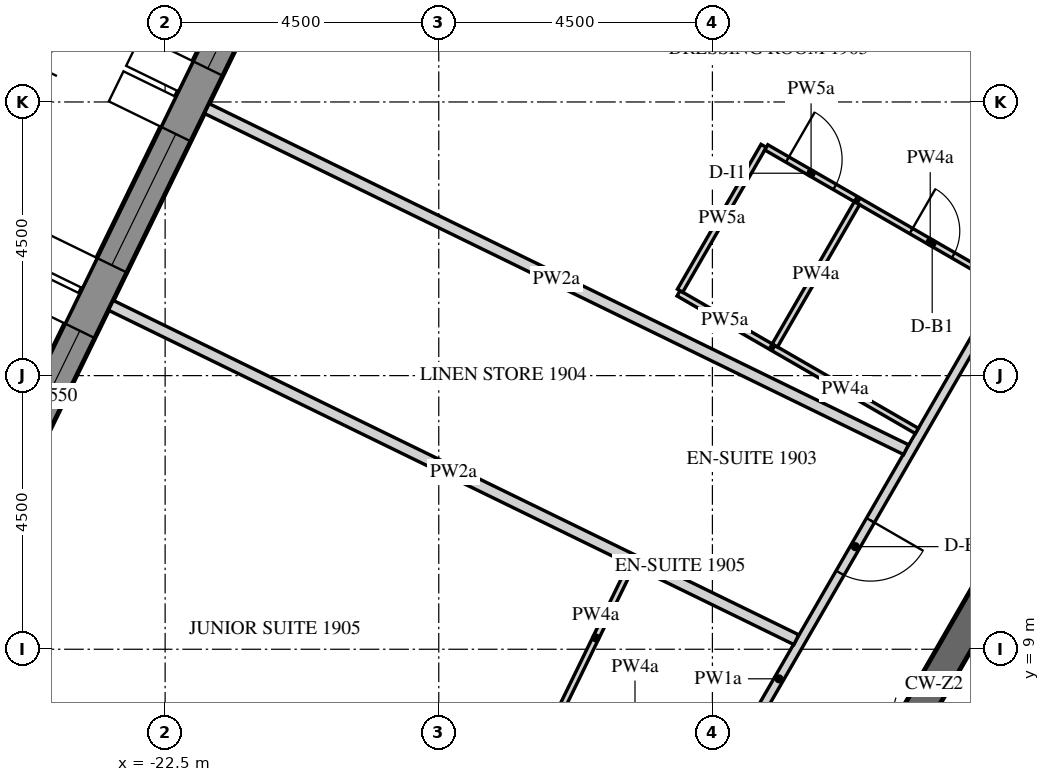
"""IFC4 building model, lengths in metres.
Left out: names, types, materials, properties, quantities, classifications, styles, units other than length and angle.
Written with IfcOpenShell. Run it as: python <this file> out.ifc"""

import sys

from ifc_helpers import new_model, si_unit, direction, frame, frame_2d, origin, place, context, subcontext, project, spatial, polyline, rectangle, outline, extrude, element, fill, save


model = new_model("IFC4")
c1 = context("Model", 3, precision=1e-05, world=origin(), true_north=direction((0.0, 1.0)))
c2 = subcontext(c1, "Body", "Model", "MODEL_VIEW")
j1 = project(units=[si_unit("LENGTHUNIT", "METRE"), si_unit("PLANEANGLEUNIT", "RADIAN")], contexts=[c1])
p1 = place(None, origin())
s1 = spatial("IfcSite", under=j1, at=p1, CompositionType="ELEMENT")
p2 = place(p1, origin())
s2 = spatial("IfcBuilding", under=s1, at=p2, CompositionType="ELEMENT")
p3 = place(p2, frame((0.0, 0.0, 238.5)))
s3 = spatial("IfcBuildingStorey", under=s2, at=p3, CompositionType="ELEMENT", Elevation=238.5)
p4 = place(p3, frame((-18.345, 25.633, -0.15), z_axis=(0.0, 0.0, 1.0), x_axis=(-0.43837181828, -0.898793718791, 0.0)))
e1 = element("IfcWall", 1, at=p4, inside=s3, PredefinedType="SOLIDWALL", context=c2, shape_type="SweptSolid", body=[
    extrude(outline(polyline([(-0.026, -0.275), (27.78, -0.275), (27.735, 0.275), (0.026, 0.275), (-0.026, -0.275)])), origin(), (0.0, 0.0, 1.0), 3.9),
])
p5 = place(p4, frame((1.879, 0.0, 1.05)))
e2 = element("IfcOpeningElement", 2, at=p5, cuts=e1, PredefinedType="OPENING", context=c2, shape_type="SweptSolid", body=[
    extrude(rectangle(XDim=2.4, YDim=2.4, at=frame_2d((1.2, 1.2))), frame((0.0, 0.285, 0.0), z_axis=(0.0, -1.0, 0.0), x_axis=(1.0, 0.0, 0.0)), (0.0, 0.0, 1.0), 0.57),
])
p6 = place(p4, frame((5.479, 0.0, 1.05)))
e3 = element("IfcOpeningElement", 3, at=p6, cuts=e1, PredefinedType="OPENING", context=c2, shape_type="SweptSolid", body=[
    extrude(rectangle(XDim=2.4, YDim=2.4, at=frame_2d((1.2, 1.2))), frame((0.0, 0.285, 0.0), z_axis=(0.0, -1.0, 0.0), x_axis=(1.0, 0.0, 0.0)), (0.0, 0.0, 1.0), 0.57),
])
p7 = place(p4, frame((9.079, 0.0, 1.05)))
e4 = element("IfcOpeningElement", 4, at=p7, cuts=e1, PredefinedType="OPENING", context=c2, shape_type="SweptSolid", body=[
    extrude(rectangle(XDim=2.4, YDim=2.4, at=frame_2d((1.2, 1.2))), frame((0.0, 0.285, 0.0), z_axis=(0.0, -1.0, 0.0), x_axis=(1.0, 0.0, 0.0)), (0.0, 0.0, 1.0), 0.57),
])
p8 = place(p4, frame((12.679, 0.0, 1.05)))
e5 = element("IfcOpeningElement", 5, at=p8, cuts=e1, PredefinedType="OPENING", context=c2, shape_type="SweptSolid", body=[
    extrude(rectangle(XDim=2.4, YDim=2.4, at=frame_2d((1.2, 1.2))), frame((0.0, 0.285, 0.0), z_axis=(0.0, -1.0, 0.0), x_axis=(1.0, 0.0, 0.0)), (0.0, 0.0, 1.0), 0.57),
])
p9 = place(p4, frame((16.279, 0.0, 1.05)))
e6 = element("IfcOpeningElement", 6, at=p9, cuts=e1, PredefinedType="OPENING", context=c2, shape_type="SweptSolid", body=[
    extrude(rectangle(XDim=2.4, YDim=2.4, at=frame_2d((1.2, 1.2))), frame((0.0, 0.285, 0.0), z_axis=(0.0, -1.0, 0.0), x_axis=(1.0, 0.0, 0.0)), (0.0, 0.0, 1.0), 0.57),
])
p10 = place(p4, frame((19.879, 0.0, 1.05)))
e7 = element("IfcOpeningElement", 7, at=p10, cuts=e1, PredefinedType="OPENING", context=c2, shape_type="SweptSolid", body=[
    extrude(rectangle(XDim=2.4, YDim=2.4, at=frame_2d((1.2, 1.2))), frame((0.0, 0.285, 0.0), z_axis=(0.0, -1.0, 0.0), x_axis=(1.0, 0.0, 0.0)), (0.0, 0.0, 1.0), 0.57),
])
p11 = place(p4, frame((23.479, 0.0, 1.05)))
e8 = element("IfcOpeningElement", 8, at=p11, cuts=e1, PredefinedType="OPENING", context=c2, shape_type="SweptSolid", body=[
    extrude(rectangle(XDim=2.4, YDim=2.4, at=frame_2d((1.2, 1.2))), frame((0.0, 0.285, 0.0), z_axis=(0.0, -1.0, 0.0), x_axis=(1.0, 0.0, 0.0)), (0.0, 0.0, 1.0), 0.57),
])
p12 = place(p3, frame((-7.361, 12.75, -0.15), z_axis=(0.0, 0.0, 1.0), x_axis=(-0.50000571537, -0.866022103989, 0.0)))
e9 = element("IfcWall", 9, at=p12, inside=s3, PredefinedType="SHEAR", context=c2, shape_type="SweptSolid", body=[
    extrude(outline(polyline([(-0.144, -0.25), (14.867, -0.25), (14.578, 0.25), (0.144, 0.25), (-0.144, -0.25)])), origin(), (0.0, 0.0, 1.0), 3.9),
])
p13 = place(p12, frame((6.49, 0.0, 0.15)))
e10 = element("IfcOpeningElement", 10, at=p13, cuts=e9, PredefinedType="OPENING", context=c2, shape_type="SweptSolid", body=[
    extrude(rectangle(XDim=1.8, YDim=2.4, at=frame_2d((0.9, 1.2))), frame((0.0, 0.26, 0.0), z_axis=(0.0, -1.0, 0.0), x_axis=(1.0, 0.0, 0.0)), (0.0, 0.0, 1.0), 0.52),
])
p14 = place(p3, frame((-5.673, 9.825, -0.15), z_axis=(0.0, 0.0, 1.0), x_axis=(-0.499995046907, -0.866028263435, 0.0)))
e11 = element("IfcWall", 11, at=p14, inside=s3, PredefinedType="SHEAR", context=c2, shape_type="SweptSolid", body=[
    extrude(outline(polyline([(-0.101, -0.175), (11.446, -0.175), (11.244, 0.175), (0.101, 0.175), (-0.101, -0.175)])), origin(), (0.0, 0.0, 1.0), 3.9),
])
p15 = place(p14, frame((4.801, 0.0, 0.15)))
e12 = element("IfcOpeningElement", 12, at=p15, cuts=e11, PredefinedType="OPENING", context=c2, shape_type="SweptSolid", body=[
    extrude(rectangle(XDim=1.8, YDim=2.4, at=frame_2d((0.9, 1.2))), frame((0.0, 0.185, 0.0), z_axis=(0.0, -1.0, 0.0), x_axis=(1.0, 0.0, 0.0)), (0.0, 0.0, 1.0), 0.37),
])
p16 = place(p3, frame((-8.673, 14.978, 0.0), z_axis=(0.0, 0.0, 1.0), x_axis=(-0.50000700621, -0.86602135871, 0.0)))
e13 = element("IfcWall", 13, at=p16, inside=s3, PredefinedType="PARTITIONING", context=c2, shape_type="SweptSolid", body=[
    extrude(rectangle(XDim=14.928, YDim=0.15, at=frame_2d((7.464, 0.0))), origin(), (0.0, 0.0, 1.0), 2.838),
])
p17 = place(p16, frame((4.454, 0.0, 0.0)))
e14 = element("IfcOpeningElement", 14, at=p17, cuts=e13, PredefinedType="OPENING", context=c2, shape_type="SweptSolid", body=[
    extrude(rectangle(XDim=1.0, YDim=2.1, at=frame_2d((0.5, 1.05))), frame((0.0, 0.085, 0.0), z_axis=(0.0, -1.0, 0.0), x_axis=(1.0, 0.0, 0.0)), (0.0, 0.0, 1.0), 0.17),
])
p18 = place(p16, frame((11.264, 0.0, 0.0)))
e15 = element("IfcOpeningElement", 15, at=p18, cuts=e13, PredefinedType="OPENING", context=c2, shape_type="SweptSolid", body=[
    extrude(rectangle(XDim=1.0, YDim=2.1, at=frame_2d((0.5, 1.05))), frame((0.0, 0.085, 0.0), z_axis=(0.0, -1.0, 0.0), x_axis=(1.0, 0.0, 0.0)), (0.0, 0.0, 1.0), 0.17),
])
p19 = place(p3, frame((-10.138, 12.591, 0.0), z_axis=(0.0, 0.0, 1.0), x_axis=(-0.866051307416, 0.49995513091, 0.0)))
e16 = element("IfcWall", 16, at=p19, inside=s3, PredefinedType="PARTITIONING", context=c2, shape_type="SweptSolid", body=[
    extrude(rectangle(XDim=2.725, YDim=0.1, at=frame_2d((1.362, 0.0))), origin(), (0.0, 0.0, 1.0), 2.838),
])
p20 = place(p3, frame((-11.098, 16.378, 0.0), z_axis=(0.0, 0.0, 1.0), x_axis=(0.866012511928, -0.500022328685, 0.0)))
e17 = element("IfcWall", 17, at=p20, inside=s3, PredefinedType="PARTITIONING", context=c2, shape_type="SweptSolid", body=[
    extrude(rectangle(XDim=2.725, YDim=0.1, at=frame_2d((1.363, 0.0))), origin(), (0.0, 0.0, 1.0), 2.838),
])
p21 = place(p20, frame((1.0, 0.0, 0.0)))
e18 = element("IfcOpeningElement", 18, at=p21, cuts=e17, PredefinedType="OPENING", context=c2, shape_type="SweptSolid", body=[
    extrude(rectangle(XDim=0.8, YDim=2.1, at=frame_2d((0.4, 1.05))), frame((0.0, 0.06, 0.0), z_axis=(0.0, -1.0, 0.0), x_axis=(1.0, 0.0, 0.0)), (0.0, 0.0, 1.0), 0.12),
])
p22 = place(p3, frame((-12.541, 13.978, 0.0), z_axis=(0.0, 0.0, 1.0), x_axis=(-0.866036909293, 0.499980071345, 0.0)))
e19 = element("IfcWall", 19, at=p22, inside=s3, PredefinedType="PARTITIONING", context=c2, shape_type="SweptSolid", body=[
    extrude(rectangle(XDim=1.75, YDim=0.1, at=frame_2d((0.875, 0.0))), origin(), (0.0, 0.0, 1.0), 2.838),
])
p23 = place(p3, frame((-14.031, 14.896, 0.0), z_axis=(0.0, 0.0, 1.0), x_axis=(0.499996545922, 0.866027397988, 0.0)))
e20 = element("IfcWall", 20, at=p23, inside=s3, PredefinedType="PARTITIONING", context=c2, shape_type="SweptSolid", body=[
    extrude(rectangle(XDim=2.75, YDim=0.1, at=frame_2d((1.375, 0.0))), origin(), (0.0, 0.0, 1.0), 2.838),
])
p24 = place(p3, frame((-12.613, 17.253, 0.0), z_axis=(0.0, 0.0, 1.0), x_axis=(0.865989465428, -0.500062241894, 0.0)))
e21 = element("IfcWall", 21, at=p24, inside=s3, PredefinedType="PARTITIONING", context=c2, shape_type="SweptSolid", body=[
    extrude(rectangle(XDim=1.7, YDim=0.1, at=frame_2d((0.85, 0.0))), origin(), (0.0, 0.0, 1.0), 2.838),
])
p25 = place(p24, frame((0.4, 0.0, 0.0)))
e22 = element("IfcOpeningElement", 22, at=p25, cuts=e21, PredefinedType="OPENING", context=c2, shape_type="SweptSolid", body=[
    extrude(rectangle(XDim=0.9, YDim=2.1, at=frame_2d((0.45, 1.05))), frame((0.0, 0.06, 0.0), z_axis=(0.0, -1.0, 0.0), x_axis=(1.0, 0.0, 0.0)), (0.0, 0.0, 1.0), 0.12),
])
p26 = place(p3, frame((-21.815, 17.892, 0.0), z_axis=(0.0, 0.0, 1.0), x_axis=(0.898799253997, -0.438360469265, 0.0)))
e23 = element("IfcWall", 23, at=p26, inside=s3, PredefinedType="PARTITIONING", context=c2, shape_type="SweptSolid", body=[
    extrude(rectangle(XDim=12.794, YDim=0.18, at=frame_2d((6.397, 0.0))), origin(), (0.0, 0.0, 1.0), 2.838),
])
p27 = place(p3, frame((-11.123, 16.335, 0.0), z_axis=(0.0, 0.0, 1.0), x_axis=(-0.499980770555, -0.866036505625, 0.0)))
e24 = element("IfcWall", 24, at=p27, inside=s3, PredefinedType="PARTITIONING", context=c2, shape_type="SweptSolid", body=[
    extrude(rectangle(XDim=2.7, YDim=0.1, at=frame_2d((1.35, 0.0))), origin(), (0.0, 0.0, 1.0), 2.838),
])
p28 = place(p3, frame((-23.393, 14.656, 0.0), z_axis=(0.0, 0.0, 1.0), x_axis=(0.898790706576, -0.43837799417, 0.0)))
e25 = element("IfcWall", 25, at=p28, inside=s3, PredefinedType="PARTITIONING", context=c2, shape_type="SweptSolid", body=[
    extrude(rectangle(XDim=12.542, YDim=0.18, at=frame_2d((6.271, 0.0))), origin(), (0.0, 0.0, 1.0), 2.838),
])
p29 = place(p3, frame((-16.001, 7.991, 0.0), z_axis=(0.0, 0.0, 1.0), x_axis=(0.438344066549, 0.89880725371, 0.0)))
e26 = element("IfcWall", 26, at=p29, inside=s3, PredefinedType="PARTITIONING", context=c2, shape_type="SweptSolid", body=[
    extrude(rectangle(XDim=2.66, YDim=0.1, at=frame_2d((1.33, 0.0))), origin(), (0.0, 0.0, 1.0), 2.838),
])
p30 = place(p3, frame((-26.549, 8.185, 0.0), z_axis=(0.0, 0.0, 1.0), x_axis=(0.8987965099, -0.438366095623, 0.0)))
e27 = element("IfcWall", 27, at=p30, inside=s3, PredefinedType="PARTITIONING", context=c2, shape_type="SweptSolid", body=[
    extrude(rectangle(XDim=12.039, YDim=0.18, at=frame_2d((6.019, 0.0))), origin(), (0.0, 0.0, 1.0), 2.838),
])
p31 = place(p6, frame((0.0, 0.205, 0.0)))
e28 = element("IfcWindow", 28, at=p31, inside=s3, PartitioningType="DOUBLE_PANEL_VERTICAL", PredefinedType="WINDOW", context=c2, shape_type="SweptSolid", body=[
    extrude(rectangle(XDim=2.4, YDim=2.4, at=frame_2d((1.2, 1.2))), frame((0.0, 0.03, 0.0), z_axis=(0.0, -1.0, 0.0), x_axis=(1.0, 0.0, 0.0)), (0.0, 0.0, 1.0), 0.06),
])
fill(e3, e28)
p32 = place(p7, frame((0.0, 0.205, 0.0)))
e29 = element("IfcWindow", 29, at=p32, inside=s3, PartitioningType="DOUBLE_PANEL_VERTICAL", PredefinedType="WINDOW", context=c2, shape_type="SweptSolid", body=[
    extrude(rectangle(XDim=2.4, YDim=2.4, at=frame_2d((1.2, 1.2))), frame((0.0, 0.03, 0.0), z_axis=(0.0, -1.0, 0.0), x_axis=(1.0, 0.0, 0.0)), (0.0, 0.0, 1.0), 0.06),
])
fill(e4, e29)
p33 = place(p8, frame((0.0, 0.205, 0.0)))
e30 = element("IfcWindow", 30, at=p33, inside=s3, PartitioningType="DOUBLE_PANEL_VERTICAL", PredefinedType="WINDOW", context=c2, shape_type="SweptSolid", body=[
    extrude(rectangle(XDim=2.4, YDim=2.4, at=frame_2d((1.2, 1.2))), frame((0.0, 0.03, 0.0), z_axis=(0.0, -1.0, 0.0), x_axis=(1.0, 0.0, 0.0)), (0.0, 0.0, 1.0), 0.06),
])
fill(e5, e30)
p34 = place(p21, origin())
e31 = element("IfcDoor", 31, at=p34, inside=s3, OperationType="SINGLE_SWING_LEFT", PredefinedType="DOOR", context=c2, shape_type="SweptSolid", body=[
    extrude(rectangle(XDim=0.8, YDim=2.1, at=frame_2d((0.4, 1.05))), frame((0.0, 0.025, 0.0), z_axis=(0.0, -1.0, 0.0), x_axis=(1.0, 0.0, 0.0)), (0.0, 0.0, 1.0), 0.05),
])
fill(e18, e31)
p35 = place(p25, origin())
e32 = element("IfcDoor", 32, at=p35, inside=s3, OperationType="SINGLE_SWING_LEFT", PredefinedType="DOOR", context=c2, shape_type="SweptSolid", body=[
    extrude(rectangle(XDim=0.9, YDim=2.1, at=frame_2d((0.45, 1.05))), frame((0.0, 0.025, 0.0), z_axis=(0.0, -1.0, 0.0), x_axis=(1.0, 0.0, 0.0)), (0.0, 0.0, 1.0), 0.05),
])
fill(e22, e32)
p36 = place(p17, origin())
e33 = element("IfcDoor", 33, at=p36, inside=s3, OperationType="SINGLE_SWING_LEFT", PredefinedType="DOOR", context=c2, shape_type="SweptSolid", body=[
    extrude(rectangle(XDim=1.0, YDim=2.1, at=frame_2d((0.5, 1.05))), frame((0.0, 0.025, 0.0), z_axis=(0.0, -1.0, 0.0), x_axis=(1.0, 0.0, 0.0)), (0.0, 0.0, 1.0), 0.05),
])
fill(e14, e33)
save(model, sys.argv[1])
